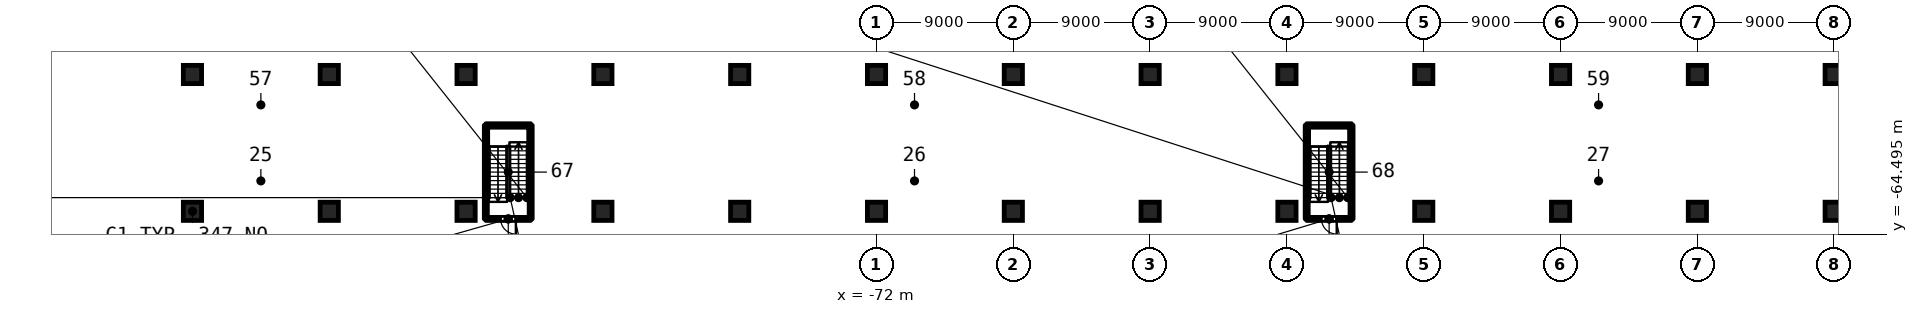
"""IFC4 building model, lengths in metres.
Left out: names, types, materials, properties, quantities, classifications, styles, units other than length and angle.
Written with IfcOpenShell. Run it as: python <this file> out.ifc"""

import sys

from ifc_helpers import new_model, si_unit, direction, frame, frame_2d, origin, origin_2d, place, context, subcontext, project, spatial, rectangle, extrude, element, fill, save


model = new_model("IFC4")
c1 = context("Model", 3, precision=1e-05, world=origin(), true_north=direction((0.0, 1.0)))
c2 = subcontext(c1, "Body", "Model", "MODEL_VIEW")
j1 = project(units=[si_unit("LENGTHUNIT", "METRE"), si_unit("PLANEANGLEUNIT", "RADIAN")], contexts=[c1])
p1 = place(None, origin())
s1 = spatial("IfcSite", under=j1, at=p1, CompositionType="ELEMENT")
p2 = place(p1, origin())
s2 = spatial("IfcBuilding", under=s1, at=p2, CompositionType="ELEMENT")
p3 = place(p2, frame((0.0, 0.0, -9.0)))
s3 = spatial("IfcBuildingStorey", under=s2, at=p3, CompositionType="ELEMENT", Elevation=-9.0)
for number, where, z_axis, x_axis in (
    (1, (-117.0, -63.0, 0.0), (0.0, 0.0, 1.0), (1.0, 0.0, 0.0)),
    (2, (-117.0, -54.0, 0.0), (0.0, 0.0, 1.0), (1.0, 0.0, 0.0)),
    (3, (-108.0, -63.0, 0.0), (0.0, 0.0, 1.0), (1.0, 0.0, 0.0)),
    (4, (-108.0, -54.0, 0.0), (0.0, 0.0, 1.0), (1.0, 0.0, 0.0)),
    (5, (-99.0, -63.0, 0.0), (0.0, 0.0, 1.0), (1.0, 0.0, 0.0)),
    (6, (-99.0, -54.0, 0.0), (0.0, 0.0, 1.0), (1.0, 0.0, 0.0)),
    (7, (-90.0, -63.0, 0.0), (0.0, 0.0, 1.0), (1.0, 0.0, 0.0)),
    (8, (-90.0, -54.0, 0.0), (0.0, 0.0, 1.0), (1.0, 0.0, 0.0)),
    (9, (-81.0, -63.0, 0.0), (0.0, 0.0, 1.0), (1.0, 0.0, 0.0)),
    (10, (-81.0, -54.0, 0.0), (0.0, 0.0, 1.0), (1.0, 0.0, 0.0)),
    (11, (-72.0, -63.0, 0.0), (0.0, 0.0, 1.0), (1.0, 0.0, 0.0)),
    (12, (-72.0, -54.0, 0.0), (0.0, 0.0, 1.0), (1.0, 0.0, 0.0)),
    (13, (-63.0, -63.0, 0.0), (0.0, 0.0, 1.0), (1.0, 0.0, 0.0)),
    (14, (-63.0, -54.0, 0.0), (0.0, 0.0, 1.0), (1.0, 0.0, 0.0)),
    (15, (-54.0, -63.0, 0.0), (0.0, 0.0, 1.0), (1.0, 0.0, 0.0)),
    (16, (-54.0, -54.0, 0.0), (0.0, 0.0, 1.0), (1.0, 0.0, 0.0)),
    (17, (-45.0, -63.0, 0.0), (0.0, 0.0, 1.0), (1.0, 0.0, 0.0)),
    (18, (-45.0, -54.0, 0.0), (0.0, 0.0, 1.0), (1.0, 0.0, 0.0)),
    (19, (-36.0, -63.0, 0.0), (0.0, 0.0, 1.0), (1.0, 0.0, 0.0)),
    (20, (-36.0, -54.0, 0.0), (0.0, 0.0, 1.0), (1.0, 0.0, 0.0)),
    (21, (-27.0, -63.0, 0.0), (0.0, 0.0, 1.0), (1.0, 0.0, 0.0)),
    (22, (-27.0, -54.0, 0.0), (0.0, 0.0, 1.0), (1.0, 0.0, 0.0)),
    (23, (-18.0, -63.0, 0.0), (0.0, 0.0, 1.0), (1.0, 0.0, 0.0)),
    (24, (-18.0, -54.0, 0.0), (0.0, 0.0, 1.0), (1.0, 0.0, 0.0)),
    (25, (-9.0, -63.0, 0.0), (0.0, 0.0, 1.0), (1.0, 0.0, 0.0)),
    (26, (-9.0, -54.0, 0.0), (0.0, 0.0, 1.0), (1.0, 0.0, 0.0)),
):
    element("IfcColumn", number, at=place(p3, frame(where, z_axis=z_axis, x_axis=x_axis)), inside=s3, PredefinedType="COLUMN", context=c2, shape_type="SweptSolid", body=[
        extrude(rectangle(XDim=1.2, YDim=1.2, at=origin_2d()), origin(), (0.0, 0.0, 1.0), 4.5),
    ])
p4 = place(p3, frame((-94.75, -63.5, 0.0), z_axis=(0.0, 0.0, 1.0), x_axis=(-1.0, 0.0, 0.0)))
e27 = element("IfcWall", 27, at=p4, inside=s3, PredefinedType="SOLIDWALL", context=c2, shape_type="SweptSolid", body=[
    extrude(rectangle(XDim=2.95, YDim=0.2, at=frame_2d((1.475, 0.0))), origin(), (0.0, 0.0, 1.0), 4.1),
])
p5 = place(p4, frame((0.975, 0.0, 0.0)))
e28 = element("IfcOpeningElement", 28, at=p5, cuts=e27, PredefinedType="OPENING", context=c2, shape_type="SweptSolid", body=[
    extrude(rectangle(XDim=1.0, YDim=2.1, at=frame_2d((0.5, 1.05))), frame((0.0, 0.11, 0.0), z_axis=(0.0, -1.0, 0.0), x_axis=(1.0, 0.0, 0.0)), (0.0, 0.0, 1.0), 0.22),
])
p6 = place(p3, frame((-97.7, -63.5, 0.0), z_axis=(0.0, 0.0, 1.0), x_axis=(0.0, 1.0, 0.0)))
e29 = element("IfcWall", 29, at=p6, inside=s3, PredefinedType="SOLIDWALL", context=c2, shape_type="SweptSolid", body=[
    extrude(rectangle(XDim=6.16, YDim=0.2, at=frame_2d((3.08, 0.0))), origin(), (0.0, 0.0, 1.0), 4.1),
])
p7 = place(p3, frame((-97.7, -57.34, 0.0), z_axis=(0.0, 0.0, 1.0), x_axis=(1.0, 0.0, 0.0)))
e30 = element("IfcWall", 30, at=p7, inside=s3, PredefinedType="SOLIDWALL", context=c2, shape_type="SweptSolid", body=[
    extrude(rectangle(XDim=2.95, YDim=0.2, at=frame_2d((1.475, 0.0))), origin(), (0.0, 0.0, 1.0), 4.1),
])
p8 = place(p3, frame((-94.75, -57.34, 0.0), z_axis=(0.0, 0.0, 1.0), x_axis=(0.0, -1.0, 0.0)))
e31 = element("IfcWall", 31, at=p8, inside=s3, PredefinedType="SOLIDWALL", context=c2, shape_type="SweptSolid", body=[
    extrude(rectangle(XDim=6.16, YDim=0.2, at=frame_2d((3.08, 0.0))), origin(), (0.0, 0.0, 1.0), 4.1),
])
p9 = place(p3, frame((-40.75, -63.5, 0.0), z_axis=(0.0, 0.0, 1.0), x_axis=(-1.0, 0.0, 0.0)))
e32 = element("IfcWall", 32, at=p9, inside=s3, PredefinedType="SOLIDWALL", context=c2, shape_type="SweptSolid", body=[
    extrude(rectangle(XDim=2.95, YDim=0.2, at=frame_2d((1.475, 0.0))), origin(), (0.0, 0.0, 1.0), 4.1),
])
p10 = place(p9, frame((0.975, 0.0, 0.0)))
e33 = element("IfcOpeningElement", 33, at=p10, cuts=e32, PredefinedType="OPENING", context=c2, shape_type="SweptSolid", body=[
    extrude(rectangle(XDim=1.0, YDim=2.1, at=frame_2d((0.5, 1.05))), frame((0.0, 0.11, 0.0), z_axis=(0.0, -1.0, 0.0), x_axis=(1.0, 0.0, 0.0)), (0.0, 0.0, 1.0), 0.22),
])
p11 = place(p3, frame((-43.7, -63.5, 0.0), z_axis=(0.0, 0.0, 1.0), x_axis=(0.0, 1.0, 0.0)))
e34 = element("IfcWall", 34, at=p11, inside=s3, PredefinedType="SOLIDWALL", context=c2, shape_type="SweptSolid", body=[
    extrude(rectangle(XDim=6.16, YDim=0.2, at=frame_2d((3.08, 0.0))), origin(), (0.0, 0.0, 1.0), 4.1),
])
p12 = place(p3, frame((-43.7, -57.34, 0.0), z_axis=(0.0, 0.0, 1.0), x_axis=(1.0, 0.0, 0.0)))
e35 = element("IfcWall", 35, at=p12, inside=s3, PredefinedType="SOLIDWALL", context=c2, shape_type="SweptSolid", body=[
    extrude(rectangle(XDim=2.95, YDim=0.2, at=frame_2d((1.475, 0.0))), origin(), (0.0, 0.0, 1.0), 4.1),
])
p13 = place(p3, frame((-40.75, -57.34, 0.0), z_axis=(0.0, 0.0, 1.0), x_axis=(0.0, -1.0, 0.0)))
e36 = element("IfcWall", 36, at=p13, inside=s3, PredefinedType="SOLIDWALL", context=c2, shape_type="SweptSolid", body=[
    extrude(rectangle(XDim=6.16, YDim=0.2, at=frame_2d((3.08, 0.0))), origin(), (0.0, 0.0, 1.0), 4.1),
])
p14 = place(p5, origin())
e37 = element("IfcDoor", 37, at=p14, inside=s3, OperationType="SINGLE_SWING_LEFT", PredefinedType="DOOR", context=c2, shape_type="SweptSolid", body=[
    extrude(rectangle(XDim=1.0, YDim=2.1, at=frame_2d((0.5, 1.05))), frame((0.0, 0.025, 0.0), z_axis=(0.0, -1.0, 0.0), x_axis=(1.0, 0.0, 0.0)), (0.0, 0.0, 1.0), 0.05),
])
fill(e28, e37)
p15 = place(p10, origin())
e38 = element("IfcDoor", 38, at=p15, inside=s3, OperationType="SINGLE_SWING_LEFT", PredefinedType="DOOR", context=c2, shape_type="SweptSolid", body=[
    extrude(rectangle(XDim=1.0, YDim=2.1, at=frame_2d((0.5, 1.05))), frame((0.0, 0.025, 0.0), z_axis=(0.0, -1.0, 0.0), x_axis=(1.0, 0.0, 0.0)), (0.0, 0.0, 1.0), 0.05),
])
fill(e33, e38)
save(model, sys.argv[1])
